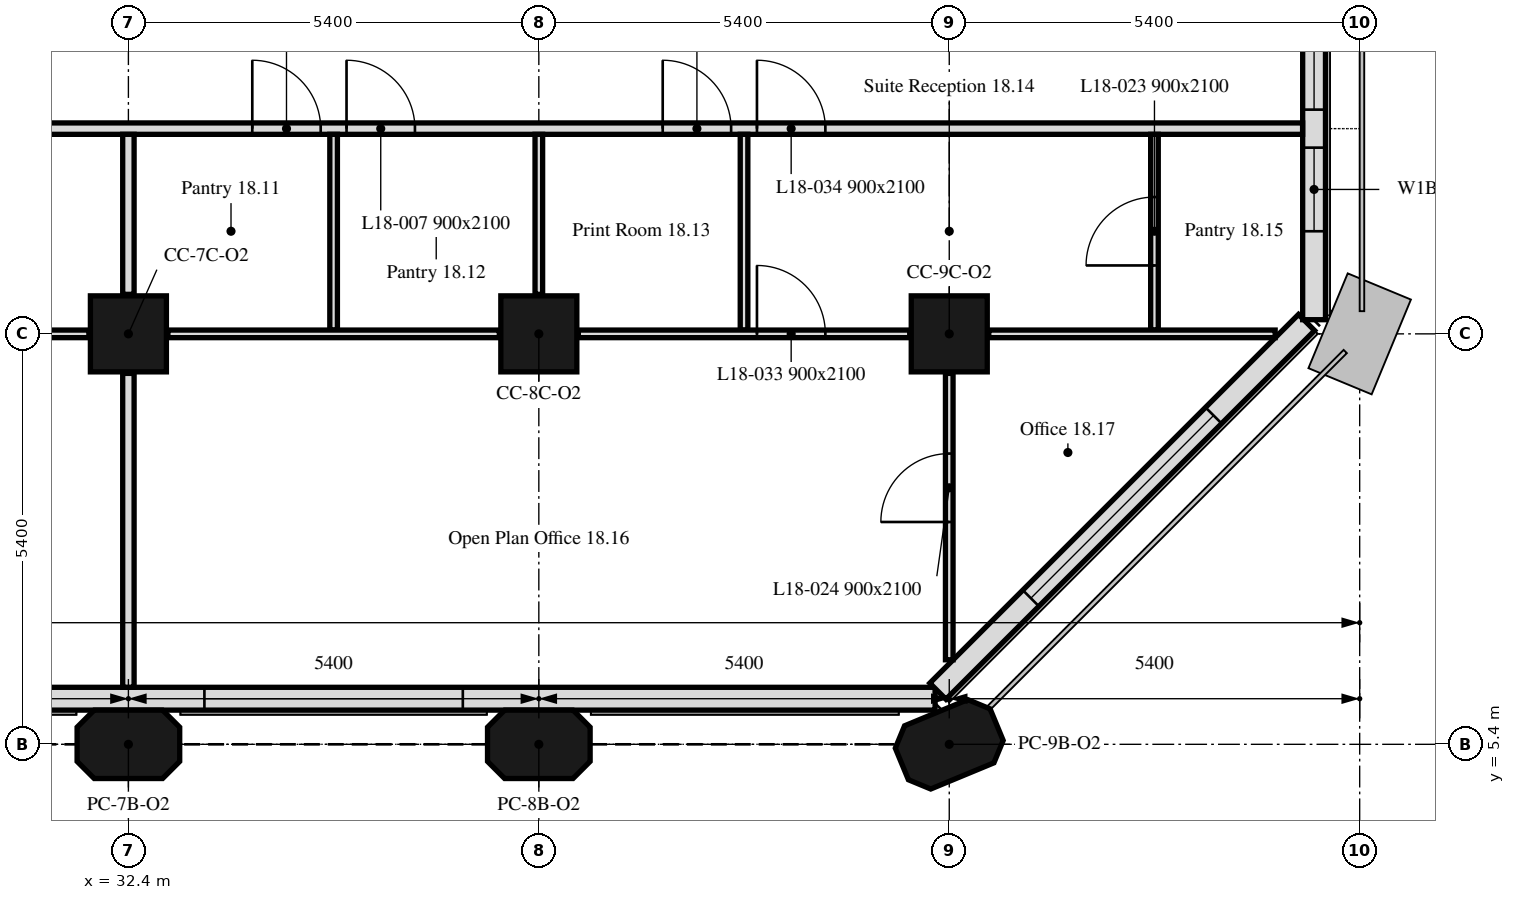
"""IFC4 building model, lengths in metres.
Left out: names, types, materials, properties, quantities, classifications, styles, units other than length and angle.
Written with IfcOpenShell. Run it as: python <this file> out.ifc"""

import sys

from ifc_helpers import new_model, si_unit, direction, frame, frame_2d, origin, origin_2d, place, context, subcontext, project, spatial, polyline, rectangle, outline, extrude, element, fill, save


model = new_model("IFC4")
c1 = context("Model", 3, precision=1e-05, world=origin(), true_north=direction((0.0, 1.0)))
c2 = subcontext(c1, "Body", "Model", "MODEL_VIEW")
j1 = project(units=[si_unit("LENGTHUNIT", "METRE"), si_unit("PLANEANGLEUNIT", "RADIAN")], contexts=[c1])
p1 = place(None, origin())
s1 = spatial("IfcSite", under=j1, at=p1, CompositionType="ELEMENT")
p2 = place(p1, origin())
s2 = spatial("IfcBuilding", under=s1, at=p2, CompositionType="ELEMENT")
p3 = place(p2, frame((0.0, 0.0, 80.2)))
s3 = spatial("IfcBuildingStorey", under=s2, at=p3, CompositionType="ELEMENT", Elevation=80.2)
for number, where, z_axis, x_axis in (
    (1, (32.4, 5.4, 0.0), (0.0, 0.0, 1.0), (1.0, 0.0, 0.0)),
    (2, (37.8, 5.4, 0.0), (0.0, 0.0, 1.0), (1.0, 0.0, 0.0)),
    (3, (43.2, 5.4, 0.0), (0.0, 0.0, 1.0), (0.924, 0.383, 0.0)),
):
    element("IfcColumn", number, at=place(p3, frame(where, z_axis=z_axis, x_axis=x_axis)), inside=s3, PredefinedType="COLUMN", context=c2, shape_type="SweptSolid", body=[
        extrude(outline(polyline([(-0.45, -0.45), (0.45, -0.45), (0.675, -0.225), (0.675, 0.225), (0.45, 0.45), (-0.45, 0.45), (-0.675, 0.225), (-0.675, -0.225), (-0.45, -0.45)])), origin(), (0.0, 0.0, 1.0), 3.5),
    ])
for number, where, z_axis, x_axis in (
    (4, (32.4, 10.8, 0.0), (0.0, 0.0, 1.0), (1.0, 0.0, 0.0)),
    (5, (37.8, 10.8, 0.0), (0.0, 0.0, 1.0), (1.0, 0.0, 0.0)),
    (6, (43.2, 10.8, 0.0), (0.0, 0.0, 1.0), (1.0, 0.0, 0.0)),
):
    element("IfcColumn", number, at=place(p3, frame(where, z_axis=z_axis, x_axis=x_axis)), inside=s3, PredefinedType="COLUMN", context=c2, shape_type="SweptSolid", body=[
        extrude(rectangle(XDim=1.0, YDim=1.0, at=origin_2d()), origin(), (0.0, 0.0, 1.0), 3.5),
    ])
p4 = place(p3, frame((10.986, 6.0, 0.0), z_axis=(0.0, 0.0, 1.0), x_axis=(1.0, 0.0, 0.0)))
e7 = element("IfcWall", 7, at=p4, inside=s3, PredefinedType="SOLIDWALL", context=c2, shape_type="SweptSolid", body=[
    extrude(rectangle(XDim=32.027, YDim=0.3, at=frame_2d((16.014, 0.0))), origin(), (0.0, 0.0, 1.0), 3.5),
])
p5 = place(p4, frame((0.814, 0.0, 0.9)))
e8 = element("IfcOpeningElement", 8, at=p5, cuts=e7, PredefinedType="OPENING", context=c2, shape_type="SweptSolid", body=[
    extrude(rectangle(XDim=3.4, YDim=1.7, at=frame_2d((1.7, 0.85))), frame((0.0, 0.16, 0.0), z_axis=(0.0, -1.0, 0.0), x_axis=(1.0, 0.0, 0.0)), (0.0, 0.0, 1.0), 0.32),
])
p6 = place(p4, frame((11.614, 0.0, 0.9)))
e9 = element("IfcOpeningElement", 9, at=p6, cuts=e7, PredefinedType="OPENING", context=c2, shape_type="SweptSolid", body=[
    extrude(rectangle(XDim=3.4, YDim=1.7, at=frame_2d((1.7, 0.85))), frame((0.0, 0.16, 0.0), z_axis=(0.0, -1.0, 0.0), x_axis=(1.0, 0.0, 0.0)), (0.0, 0.0, 1.0), 0.32),
])
p7 = place(p4, frame((22.414, 0.0, 0.9)))
e10 = element("IfcOpeningElement", 10, at=p7, cuts=e7, PredefinedType="OPENING", context=c2, shape_type="SweptSolid", body=[
    extrude(rectangle(XDim=3.4, YDim=1.7, at=frame_2d((1.7, 0.85))), frame((0.0, 0.16, 0.0), z_axis=(0.0, -1.0, 0.0), x_axis=(1.0, 0.0, 0.0)), (0.0, 0.0, 1.0), 0.32),
])
p8 = place(p3, frame((43.051, 6.099, 0.0), z_axis=(0.0, 0.0, 1.0), x_axis=(0.707106781187, 0.707106781187, 0.0)))
e11 = element("IfcWall", 11, at=p8, inside=s3, PredefinedType="SOLIDWALL", context=c2, shape_type="SweptSolid", body=[
    extrude(rectangle(XDim=6.86, YDim=0.3, at=frame_2d((3.43, 0.0))), origin(), (0.0, 0.0, 1.0), 3.5),
])
p9 = place(p8, frame((1.73, 0.0, 0.9)))
e12 = element("IfcOpeningElement", 12, at=p9, cuts=e11, PredefinedType="OPENING", context=c2, shape_type="SweptSolid", body=[
    extrude(rectangle(XDim=3.4, YDim=1.7, at=frame_2d((1.7, 0.85))), frame((0.0, 0.16, 0.0), z_axis=(0.0, -1.0, 0.0), x_axis=(1.0, 0.0, 0.0)), (0.0, 0.0, 1.0), 0.32),
])
p10 = place(p3, frame((48.0, 10.986, 0.0), z_axis=(0.0, 0.0, 1.0), x_axis=(0.0, 1.0, 0.0)))
e13 = element("IfcWall", 13, at=p10, inside=s3, PredefinedType="SOLIDWALL", context=c2, shape_type="SweptSolid", body=[
    extrude(rectangle(XDim=32.027, YDim=0.3, at=frame_2d((16.014, 0.0))), origin(), (0.0, 0.0, 1.0), 3.5),
])
p11 = place(p10, frame((1.164, 0.0, 0.9)))
e14 = element("IfcOpeningElement", 14, at=p11, cuts=e13, PredefinedType="OPENING", context=c2, shape_type="SweptSolid", body=[
    extrude(rectangle(XDim=1.1, YDim=1.7, at=frame_2d((0.55, 0.85))), frame((0.0, 0.16, 0.0), z_axis=(0.0, -1.0, 0.0), x_axis=(1.0, 0.0, 0.0)), (0.0, 0.0, 1.0), 0.32),
])
p12 = place(p10, frame((2.764, 0.0, 0.9)))
e15 = element("IfcOpeningElement", 15, at=p12, cuts=e13, PredefinedType="OPENING", context=c2, shape_type="SweptSolid", body=[
    extrude(rectangle(XDim=1.1, YDim=1.7, at=frame_2d((0.55, 0.85))), frame((0.0, 0.16, 0.0), z_axis=(0.0, -1.0, 0.0), x_axis=(1.0, 0.0, 0.0)), (0.0, 0.0, 1.0), 0.32),
])
p13 = place(p10, frame((11.614, 0.0, 0.9)))
e16 = element("IfcOpeningElement", 16, at=p13, cuts=e13, PredefinedType="OPENING", context=c2, shape_type="SweptSolid", body=[
    extrude(rectangle(XDim=3.4, YDim=1.7, at=frame_2d((1.7, 0.85))), frame((0.0, 0.16, 0.0), z_axis=(0.0, -1.0, 0.0), x_axis=(1.0, 0.0, 0.0)), (0.0, 0.0, 1.0), 0.32),
])
p14 = place(p10, frame((22.764, 0.0, 0.9)))
e17 = element("IfcOpeningElement", 17, at=p14, cuts=e13, PredefinedType="OPENING", context=c2, shape_type="SweptSolid", body=[
    extrude(rectangle(XDim=1.1, YDim=1.7, at=frame_2d((0.55, 0.85))), frame((0.0, 0.16, 0.0), z_axis=(0.0, -1.0, 0.0), x_axis=(1.0, 0.0, 0.0)), (0.0, 0.0, 1.0), 0.32),
])
p15 = place(p10, frame((24.364, 0.0, 0.9)))
e18 = element("IfcOpeningElement", 18, at=p15, cuts=e13, PredefinedType="OPENING", context=c2, shape_type="SweptSolid", body=[
    extrude(rectangle(XDim=1.1, YDim=1.7, at=frame_2d((0.55, 0.85))), frame((0.0, 0.16, 0.0), z_axis=(0.0, -1.0, 0.0), x_axis=(1.0, 0.0, 0.0)), (0.0, 0.0, 1.0), 0.32),
])
p16 = place(p3, frame((6.151, 13.5, 0.0), z_axis=(0.0, 0.0, 1.0), x_axis=(1.0, 0.0, 0.0)))
e19 = element("IfcWall", 19, at=p16, inside=s3, PredefinedType="PARTITIONING", context=c2, shape_type="SweptSolid", body=[
    extrude(rectangle(XDim=41.698, YDim=0.15, at=frame_2d((20.849, 0.0))), origin(), (0.0, 0.0, 1.0), 3.5),
])
p17 = place(p16, frame((11.679, 0.0, 0.0)))
e20 = element("IfcOpeningElement", 20, at=p17, cuts=e19, PredefinedType="OPENING", context=c2, shape_type="SweptSolid", body=[
    extrude(rectangle(XDim=0.9, YDim=2.1, at=frame_2d((0.45, 1.05))), frame((0.0, 0.075, 0.0), z_axis=(0.0, -1.0, 0.0), x_axis=(1.0, 0.0, 0.0)), (0.0, 0.0, 1.0), 0.15),
])
p18 = place(p16, frame((27.879, 0.0, 0.0)))
e21 = element("IfcOpeningElement", 21, at=p18, cuts=e19, PredefinedType="OPENING", context=c2, shape_type="SweptSolid", body=[
    extrude(rectangle(XDim=0.9, YDim=2.1, at=frame_2d((0.45, 1.05))), frame((0.0, 0.075, 0.0), z_axis=(0.0, -1.0, 0.0), x_axis=(1.0, 0.0, 0.0)), (0.0, 0.0, 1.0), 0.15),
])
p19 = place(p16, frame((29.119, 0.0, 0.0)))
e22 = element("IfcOpeningElement", 22, at=p19, cuts=e19, PredefinedType="OPENING", context=c2, shape_type="SweptSolid", body=[
    extrude(rectangle(XDim=0.9, YDim=2.1, at=frame_2d((0.45, 1.05))), frame((0.0, 0.075, 0.0), z_axis=(0.0, -1.0, 0.0), x_axis=(1.0, 0.0, 0.0)), (0.0, 0.0, 1.0), 0.15),
])
p20 = place(p16, frame((33.279, 0.0, 0.0)))
e23 = element("IfcOpeningElement", 23, at=p20, cuts=e19, PredefinedType="OPENING", context=c2, shape_type="SweptSolid", body=[
    extrude(rectangle(XDim=0.9, YDim=2.1, at=frame_2d((0.45, 1.05))), frame((0.0, 0.075, 0.0), z_axis=(0.0, -1.0, 0.0), x_axis=(1.0, 0.0, 0.0)), (0.0, 0.0, 1.0), 0.15),
])
p21 = place(p16, frame((2.174, 0.0, 0.0)))
e24 = element("IfcOpeningElement", 24, at=p21, cuts=e19, PredefinedType="OPENING", context=c2, shape_type="SweptSolid", body=[
    extrude(rectangle(XDim=0.9, YDim=2.1, at=frame_2d((0.45, 1.05))), frame((0.0, 0.075, 0.0), z_axis=(0.0, -1.0, 0.0), x_axis=(1.0, 0.0, 0.0)), (0.0, 0.0, 1.0), 0.15),
])
p22 = place(p16, frame((34.519, 0.0, 0.0)))
e25 = element("IfcOpeningElement", 25, at=p22, cuts=e19, PredefinedType="OPENING", context=c2, shape_type="SweptSolid", body=[
    extrude(rectangle(XDim=0.9, YDim=2.1, at=frame_2d((0.45, 1.05))), frame((0.0, 0.075, 0.0), z_axis=(0.0, -1.0, 0.0), x_axis=(1.0, 0.0, 0.0)), (0.0, 0.0, 1.0), 0.15),
])
p23 = place(p3, frame((27.52, 10.8, 0.0), z_axis=(0.0, 0.0, 1.0), x_axis=(1.0, 0.0, 0.0)))
e26 = element("IfcWall", 26, at=p23, inside=s3, PredefinedType="PARTITIONING", context=c2, shape_type="SweptSolid", body=[
    extrude(rectangle(XDim=4.36, YDim=0.1, at=frame_2d((2.18, 0.0))), origin(), (0.0, 0.0, 1.0), 3.5),
])
p24 = place(p23, frame((1.73, 0.0, 0.0)))
e27 = element("IfcOpeningElement", 27, at=p24, cuts=e26, PredefinedType="OPENING", context=c2, shape_type="SweptSolid", body=[
    extrude(rectangle(XDim=0.9, YDim=2.1, at=frame_2d((0.45, 1.05))), frame((0.0, 0.05, 0.0), z_axis=(0.0, -1.0, 0.0), x_axis=(1.0, 0.0, 0.0)), (0.0, 0.0, 1.0), 0.1),
])
p25 = place(p3, frame((32.4, 11.32, 0.0), z_axis=(0.0, 0.0, 1.0), x_axis=(0.0, 1.0, 0.0)))
e28 = element("IfcWall", 28, at=p25, inside=s3, PredefinedType="PARTITIONING", context=c2, shape_type="SweptSolid", body=[
    extrude(rectangle(XDim=2.105, YDim=0.15, at=frame_2d((1.052, 0.0))), origin(), (0.0, 0.0, 1.0), 3.5),
])
p26 = place(p3, frame((32.4, 6.151, 0.0), z_axis=(0.0, 0.0, 1.0), x_axis=(0.0, 1.0, 0.0)))
e29 = element("IfcWall", 29, at=p26, inside=s3, PredefinedType="PARTITIONING", context=c2, shape_type="SweptSolid", body=[
    extrude(rectangle(XDim=4.129, YDim=0.15, at=frame_2d((2.064, 0.0))), origin(), (0.0, 0.0, 1.0), 3.5),
])
p27 = place(p3, frame((35.1, 10.85, 0.0), z_axis=(0.0, 0.0, 1.0), x_axis=(0.0, 1.0, 0.0)))
e30 = element("IfcWall", 30, at=p27, inside=s3, PredefinedType="PARTITIONING", context=c2, shape_type="SweptSolid", body=[
    extrude(rectangle(XDim=2.575, YDim=0.1, at=frame_2d((1.288, 0.0))), origin(), (0.0, 0.0, 1.0), 3.5),
])
p28 = place(p3, frame((32.92, 10.8, 0.0), z_axis=(0.0, 0.0, 1.0), x_axis=(1.0, 0.0, 0.0)))
e31 = element("IfcWall", 31, at=p28, inside=s3, PredefinedType="PARTITIONING", context=c2, shape_type="SweptSolid", body=[
    extrude(rectangle(XDim=4.36, YDim=0.1, at=frame_2d((2.18, 0.0))), origin(), (0.0, 0.0, 1.0), 3.5),
])
p29 = place(p3, frame((37.8, 11.32, 0.0), z_axis=(0.0, 0.0, 1.0), x_axis=(0.0, 1.0, 0.0)))
e32 = element("IfcWall", 32, at=p29, inside=s3, PredefinedType="PARTITIONING", context=c2, shape_type="SweptSolid", body=[
    extrude(rectangle(XDim=2.105, YDim=0.1, at=frame_2d((1.052, 0.0))), origin(), (0.0, 0.0, 1.0), 3.5),
])
p30 = place(p3, frame((40.5, 10.85, 0.0), z_axis=(0.0, 0.0, 1.0), x_axis=(0.0, 1.0, 0.0)))
e33 = element("IfcWall", 33, at=p30, inside=s3, PredefinedType="PARTITIONING", context=c2, shape_type="SweptSolid", body=[
    extrude(rectangle(XDim=2.575, YDim=0.1, at=frame_2d((1.288, 0.0))), origin(), (0.0, 0.0, 1.0), 3.5),
])
p31 = place(p3, frame((38.32, 10.8, 0.0), z_axis=(0.0, 0.0, 1.0), x_axis=(1.0, 0.0, 0.0)))
e34 = element("IfcWall", 34, at=p31, inside=s3, PredefinedType="PARTITIONING", context=c2, shape_type="SweptSolid", body=[
    extrude(rectangle(XDim=4.36, YDim=0.1, at=frame_2d((2.18, 0.0))), origin(), (0.0, 0.0, 1.0), 3.5),
])
p32 = place(p31, frame((2.35, 0.0, 0.0)))
e35 = element("IfcOpeningElement", 35, at=p32, cuts=e34, PredefinedType="OPENING", context=c2, shape_type="SweptSolid", body=[
    extrude(rectangle(XDim=0.9, YDim=2.1, at=frame_2d((0.45, 1.05))), frame((0.0, 0.05, 0.0), z_axis=(0.0, -1.0, 0.0), x_axis=(1.0, 0.0, 0.0)), (0.0, 0.0, 1.0), 0.1),
])
p33 = place(p3, frame((45.9, 10.85, 0.0), z_axis=(0.0, 0.0, 1.0), x_axis=(0.0, 1.0, 0.0)))
e36 = element("IfcWall", 36, at=p33, inside=s3, PredefinedType="PARTITIONING", context=c2, shape_type="SweptSolid", body=[
    extrude(rectangle(XDim=2.575, YDim=0.1, at=frame_2d((1.288, 0.0))), origin(), (0.0, 0.0, 1.0), 3.5),
])
p34 = place(p33, frame((0.85, 0.0, 0.0)))
e37 = element("IfcOpeningElement", 37, at=p34, cuts=e36, PredefinedType="OPENING", context=c2, shape_type="SweptSolid", body=[
    extrude(rectangle(XDim=0.9, YDim=2.1, at=frame_2d((0.45, 1.05))), frame((0.0, 0.05, 0.0), z_axis=(0.0, -1.0, 0.0), x_axis=(1.0, 0.0, 0.0)), (0.0, 0.0, 1.0), 0.1),
])
p35 = place(p3, frame((43.72, 10.8, 0.0), z_axis=(0.0, 0.0, 1.0), x_axis=(1.0, 0.0, 0.0)))
e38 = element("IfcWall", 38, at=p35, inside=s3, PredefinedType="PARTITIONING", context=c2, shape_type="SweptSolid", body=[
    extrude(rectangle(XDim=3.768, YDim=0.1, at=frame_2d((1.884, 0.0))), origin(), (0.0, 0.0, 1.0), 3.5),
])
p36 = place(p3, frame((43.2, 6.512, 0.0), z_axis=(0.0, 0.0, 1.0), x_axis=(0.0, 1.0, 0.0)))
e39 = element("IfcWall", 39, at=p36, inside=s3, PredefinedType="PARTITIONING", context=c2, shape_type="SweptSolid", body=[
    extrude(rectangle(XDim=3.768, YDim=0.1, at=frame_2d((1.884, 0.0))), origin(), (0.0, 0.0, 1.0), 3.5),
])
p37 = place(p36, frame((1.813, 0.0, 0.0)))
e40 = element("IfcOpeningElement", 40, at=p37, cuts=e39, PredefinedType="OPENING", context=c2, shape_type="SweptSolid", body=[
    extrude(rectangle(XDim=0.9, YDim=2.1, at=frame_2d((0.45, 1.05))), frame((0.0, 0.05, 0.0), z_axis=(0.0, -1.0, 0.0), x_axis=(1.0, 0.0, 0.0)), (0.0, 0.0, 1.0), 0.1),
])
p38 = place(p7, origin())
e41 = element("IfcWindow", 41, at=p38, inside=s3, PartitioningType="SINGLE_PANEL", PredefinedType="WINDOW", context=c2, shape_type="SweptSolid", body=[
    extrude(rectangle(XDim=3.4, YDim=1.7, at=frame_2d((1.7, 0.85))), frame((0.0, 0.03, 0.0), z_axis=(0.0, -1.0, 0.0), x_axis=(1.0, 0.0, 0.0)), (0.0, 0.0, 1.0), 0.06),
])
fill(e10, e41)
p39 = place(p9, origin())
e42 = element("IfcWindow", 42, at=p39, inside=s3, PartitioningType="SINGLE_PANEL", PredefinedType="WINDOW", context=c2, shape_type="SweptSolid", body=[
    extrude(rectangle(XDim=3.4, YDim=1.7, at=frame_2d((1.7, 0.85))), frame((0.0, 0.03, 0.0), z_axis=(0.0, -1.0, 0.0), x_axis=(1.0, 0.0, 0.0)), (0.0, 0.0, 1.0), 0.06),
])
fill(e12, e42)
p40 = place(p11, origin())
e43 = element("IfcWindow", 43, at=p40, inside=s3, PartitioningType="SINGLE_PANEL", PredefinedType="WINDOW", context=c2, shape_type="SweptSolid", body=[
    extrude(rectangle(XDim=1.1, YDim=1.7, at=frame_2d((0.55, 0.85))), frame((0.0, 0.03, 0.0), z_axis=(0.0, -1.0, 0.0), x_axis=(1.0, 0.0, 0.0)), (0.0, 0.0, 1.0), 0.06),
])
fill(e14, e43)
p41 = place(p12, origin())
e44 = element("IfcWindow", 44, at=p41, inside=s3, PartitioningType="SINGLE_PANEL", PredefinedType="WINDOW", context=c2, shape_type="SweptSolid", body=[
    extrude(rectangle(XDim=1.1, YDim=1.7, at=frame_2d((0.55, 0.85))), frame((0.0, 0.03, 0.0), z_axis=(0.0, -1.0, 0.0), x_axis=(1.0, 0.0, 0.0)), (0.0, 0.0, 1.0), 0.06),
])
fill(e15, e44)
p42 = place(p18, origin())
e45 = element("IfcDoor", 45, at=p42, inside=s3, OperationType="SINGLE_SWING_RIGHT", PredefinedType="DOOR", context=c2, shape_type="SweptSolid", body=[
    extrude(rectangle(XDim=0.9, YDim=2.1, at=frame_2d((0.45, 1.05))), frame((0.0, 0.025, 0.0), z_axis=(0.0, -1.0, 0.0), x_axis=(1.0, 0.0, 0.0)), (0.0, 0.0, 1.0), 0.05),
])
fill(e21, e45)
p43 = place(p19, origin())
e46 = element("IfcDoor", 46, at=p43, inside=s3, OperationType="SINGLE_SWING_RIGHT", PredefinedType="DOOR", context=c2, shape_type="SweptSolid", body=[
    extrude(rectangle(XDim=0.9, YDim=2.1, at=frame_2d((0.45, 1.05))), frame((0.0, 0.025, 0.0), z_axis=(0.0, -1.0, 0.0), x_axis=(1.0, 0.0, 0.0)), (0.0, 0.0, 1.0), 0.05),
])
fill(e22, e46)
p44 = place(p20, origin())
e47 = element("IfcDoor", 47, at=p44, inside=s3, OperationType="SINGLE_SWING_RIGHT", PredefinedType="DOOR", context=c2, shape_type="SweptSolid", body=[
    extrude(rectangle(XDim=0.9, YDim=2.1, at=frame_2d((0.45, 1.05))), frame((0.0, 0.025, 0.0), z_axis=(0.0, -1.0, 0.0), x_axis=(1.0, 0.0, 0.0)), (0.0, 0.0, 1.0), 0.05),
])
fill(e23, e47)
p45 = place(p34, origin())
e48 = element("IfcDoor", 48, at=p45, inside=s3, OperationType="SINGLE_SWING_LEFT", PredefinedType="DOOR", context=c2, shape_type="SweptSolid", body=[
    extrude(rectangle(XDim=0.9, YDim=2.1, at=frame_2d((0.45, 1.05))), frame((0.0, 0.025, 0.0), z_axis=(0.0, -1.0, 0.0), x_axis=(1.0, 0.0, 0.0)), (0.0, 0.0, 1.0), 0.05),
])
fill(e37, e48)
p46 = place(p37, origin())
e49 = element("IfcDoor", 49, at=p46, inside=s3, OperationType="SINGLE_SWING_LEFT", PredefinedType="DOOR", context=c2, shape_type="SweptSolid", body=[
    extrude(rectangle(XDim=0.9, YDim=2.1, at=frame_2d((0.45, 1.05))), frame((0.0, 0.025, 0.0), z_axis=(0.0, -1.0, 0.0), x_axis=(1.0, 0.0, 0.0)), (0.0, 0.0, 1.0), 0.05),
])
fill(e40, e49)
p47 = place(p32, origin())
e50 = element("IfcDoor", 50, at=p47, inside=s3, OperationType="SINGLE_SWING_LEFT", PredefinedType="DOOR", context=c2, shape_type="SweptSolid", body=[
    extrude(rectangle(XDim=0.9, YDim=2.1, at=frame_2d((0.45, 1.05))), frame((0.0, 0.025, 0.0), z_axis=(0.0, -1.0, 0.0), x_axis=(1.0, 0.0, 0.0)), (0.0, 0.0, 1.0), 0.05),
])
fill(e35, e50)
p48 = place(p22, origin())
e51 = element("IfcDoor", 51, at=p48, inside=s3, OperationType="SINGLE_SWING_RIGHT", PredefinedType="DOOR", context=c2, shape_type="SweptSolid", body=[
    extrude(rectangle(XDim=0.9, YDim=2.1, at=frame_2d((0.45, 1.05))), frame((0.0, 0.025, 0.0), z_axis=(0.0, -1.0, 0.0), x_axis=(1.0, 0.0, 0.0)), (0.0, 0.0, 1.0), 0.05),
])
fill(e25, e51)
save(model, sys.argv[1])
